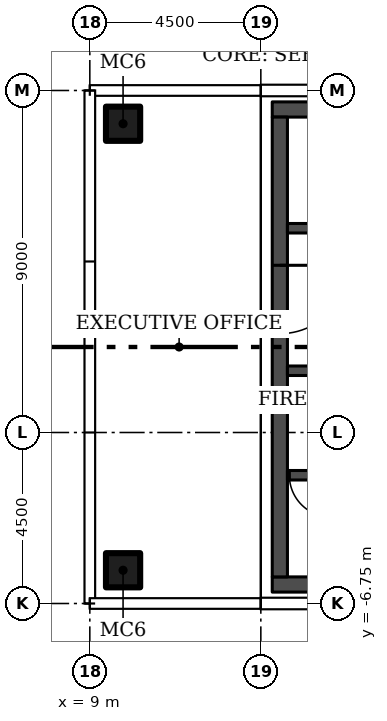
"""IFC4 building model, lengths in metres.
Left out: names, types, materials, properties, quantities, classifications, styles, units other than length and angle.
Written with IfcOpenShell. Run it as: python <this file> out.ifc"""

import sys

from ifc_helpers import new_model, si_unit, direction, frame, frame_2d, origin, origin_2d, place, context, subcontext, project, spatial, rectangle, hollow_rectangle, extrude, element, fill, save


model = new_model("IFC4")
c1 = context("Model", 3, precision=1e-05, world=origin(), true_north=direction((0.0, 1.0)))
c2 = subcontext(c1, "Body", "Model", "MODEL_VIEW")
j1 = project(units=[si_unit("LENGTHUNIT", "METRE"), si_unit("PLANEANGLEUNIT", "RADIAN")], contexts=[c1])
p1 = place(None, origin())
s1 = spatial("IfcSite", under=j1, at=p1, CompositionType="ELEMENT")
p2 = place(p1, origin())
s2 = spatial("IfcBuilding", under=s1, at=p2, CompositionType="ELEMENT")
p3 = place(p2, frame((0.0, 0.0, 230.4)))
s3 = spatial("IfcBuildingStorey", under=s2, at=p3, CompositionType="ELEMENT", Elevation=230.4)
for number, where in (
    (1, (9.875, -5.875, 0.0)),
    (2, (9.875, 5.875, 0.0)),
):
    element("IfcColumn", number, at=place(p3, frame(where)), inside=s3, PredefinedType="COLUMN", context=c2, shape_type="SweptSolid", body=[
        extrude(hollow_rectangle(XDim=0.9, YDim=0.9, WallThickness=0.036, at=origin_2d()), origin(), (0.0, 0.0, 1.0), 3.55),
    ])
for number, where in (
    (3, (13.8, -6.25, 0.0)),
    (4, (13.8, 6.25, 0.0)),
):
    element("IfcWall", number, at=place(p3, frame(where)), inside=s3, PredefinedType="SHEAR", context=c2, shape_type="SweptSolid", body=[
        extrude(rectangle(XDim=12.9, YDim=0.4, at=frame_2d((6.45, 0.0))), origin(), (0.0, 0.0, 1.0), 3.55),
    ])
p4 = place(p3, frame((14.0, 6.05, 0.0), z_axis=(0.0, 0.0, 1.0), x_axis=(0.0, -1.0, 0.0)))
e5 = element("IfcWall", 5, at=p4, inside=s3, PredefinedType="SHEAR", context=c2, shape_type="SweptSolid", body=[
    extrude(rectangle(XDim=12.1, YDim=0.4, at=frame_2d((6.05, 0.0))), origin(), (0.0, 0.0, 1.0), 3.55),
])
p5 = place(p4, frame((3.9, 0.0, 0.0)))
e6 = element("IfcOpeningElement", 6, at=p5, cuts=e5, PredefinedType="OPENING", context=c2, shape_type="SweptSolid", body=[
    extrude(rectangle(XDim=1.8, YDim=2.4, at=frame_2d((0.9, 1.2))), frame((0.0, 0.21, 0.0), z_axis=(0.0, -1.0, 0.0), x_axis=(1.0, 0.0, 0.0)), (0.0, 0.0, 1.0), 0.42),
])
p6 = place(p3, frame((26.3, -3.375, 0.0), z_axis=(0.0, 0.0, 1.0), x_axis=(-1.0, 0.0, 0.0)))
e7 = element("IfcWall", 7, at=p6, inside=s3, PredefinedType="SHEAR", context=c2, shape_type="SweptSolid", body=[
    extrude(rectangle(XDim=12.1, YDim=0.25, at=frame_2d((6.05, 0.0))), origin(), (0.0, 0.0, 1.0), 3.55),
])
p7 = place(p6, frame((10.95, 0.0, 0.0)))
e8 = element("IfcOpeningElement", 8, at=p7, cuts=e7, PredefinedType="OPENING", context=c2, shape_type="SweptSolid", body=[
    extrude(rectangle(XDim=1.1, YDim=2.1, at=frame_2d((0.55, 1.05))), frame((0.0, 0.135, 0.0), z_axis=(0.0, -1.0, 0.0), x_axis=(1.0, 0.0, 0.0)), (0.0, 0.0, 1.0), 0.27),
])
p8 = place(p3, frame((26.3, -0.625, 0.0), z_axis=(0.0, 0.0, 1.0), x_axis=(-1.0, 0.0, 0.0)))
e9 = element("IfcWall", 9, at=p8, inside=s3, PredefinedType="SHEAR", context=c2, shape_type="SweptSolid", body=[
    extrude(rectangle(XDim=12.1, YDim=0.25, at=frame_2d((6.05, 0.0))), origin(), (0.0, 0.0, 1.0), 3.55),
])
p9 = place(p8, frame((8.65, 0.0, 0.0)))
e10 = element("IfcOpeningElement", 10, at=p9, cuts=e9, PredefinedType="OPENING", context=c2, shape_type="SweptSolid", body=[
    extrude(rectangle(XDim=1.2, YDim=2.1, at=frame_2d((0.6, 1.05))), frame((0.0, 0.135, 0.0), z_axis=(0.0, -1.0, 0.0), x_axis=(1.0, 0.0, 0.0)), (0.0, 0.0, 1.0), 0.27),
])
p10 = place(p8, frame((1.7, 0.0, 0.0)))
e11 = element("IfcOpeningElement", 11, at=p10, cuts=e9, PredefinedType="OPENING", context=c2, shape_type="SweptSolid", body=[
    extrude(rectangle(XDim=0.9, YDim=2.1, at=frame_2d((0.45, 1.05))), frame((0.0, 0.135, 0.0), z_axis=(0.0, -1.0, 0.0), x_axis=(1.0, 0.0, 0.0)), (0.0, 0.0, 1.0), 0.27),
])
p11 = place(p8, frame((0.075, 0.0, 0.0)))
e12 = element("IfcOpeningElement", 12, at=p11, cuts=e9, PredefinedType="OPENING", context=c2, shape_type="SweptSolid", body=[
    extrude(rectangle(XDim=0.9, YDim=2.1, at=frame_2d((0.45, 1.05))), frame((0.0, 0.135, 0.0), z_axis=(0.0, -1.0, 0.0), x_axis=(1.0, 0.0, 0.0)), (0.0, 0.0, 1.0), 0.27),
])
p12 = place(p3, frame((14.2, 3.125, 0.0)))
e13 = element("IfcWall", 13, at=p12, inside=s3, PredefinedType="SHEAR", context=c2, shape_type="SweptSolid", body=[
    extrude(rectangle(XDim=12.1, YDim=0.25, at=frame_2d((6.05, 0.0))), origin(), (0.0, 0.0, 1.0), 3.55),
])
p13 = place(p12, frame((6.95, 0.0, 0.0)))
e14 = element("IfcOpeningElement", 14, at=p13, cuts=e13, PredefinedType="OPENING", context=c2, shape_type="SweptSolid", body=[
    extrude(rectangle(XDim=1.1, YDim=2.1, at=frame_2d((0.55, 1.05))), frame((0.0, 0.135, 0.0), z_axis=(0.0, -1.0, 0.0), x_axis=(1.0, 0.0, 0.0)), (0.0, 0.0, 1.0), 0.27),
])
p14 = place(p12, frame((10.075, 0.0, 0.0)))
e15 = element("IfcOpeningElement", 15, at=p14, cuts=e13, PredefinedType="OPENING", context=c2, shape_type="SweptSolid", body=[
    extrude(rectangle(XDim=1.1, YDim=2.1, at=frame_2d((0.55, 1.05))), frame((0.0, 0.135, 0.0), z_axis=(0.0, -1.0, 0.0), x_axis=(1.0, 0.0, 0.0)), (0.0, 0.0, 1.0), 0.27),
])
p15 = place(p12, frame((2.475, 0.0, 0.0)))
e16 = element("IfcOpeningElement", 16, at=p15, cuts=e13, PredefinedType="OPENING", context=c2, shape_type="SweptSolid", body=[
    extrude(rectangle(XDim=0.9, YDim=2.1, at=frame_2d((0.45, 1.05))), frame((0.0, 0.135, 0.0), z_axis=(0.0, -1.0, 0.0), x_axis=(1.0, 0.0, 0.0)), (0.0, 0.0, 1.0), 0.27),
])
p16 = place(p5, origin())
e17 = element("IfcDoor", 17, at=p16, inside=s3, OperationType="DOUBLE_DOOR_SINGLE_SWING", PredefinedType="DOOR", context=c2, shape_type="SweptSolid", body=[
    extrude(rectangle(XDim=1.8, YDim=2.4, at=frame_2d((0.9, 1.2))), frame((0.0, 0.025, 0.0), z_axis=(0.0, -1.0, 0.0), x_axis=(1.0, 0.0, 0.0)), (0.0, 0.0, 1.0), 0.05),
])
fill(e6, e17)
p17 = place(p7, origin())
e18 = element("IfcDoor", 18, at=p17, inside=s3, OperationType="SINGLE_SWING_RIGHT", PredefinedType="DOOR", context=c2, shape_type="SweptSolid", body=[
    extrude(rectangle(XDim=1.1, YDim=2.1, at=frame_2d((0.55, 1.05))), frame((0.0, 0.025, 0.0), z_axis=(0.0, -1.0, 0.0), x_axis=(1.0, 0.0, 0.0)), (0.0, 0.0, 1.0), 0.05),
])
fill(e8, e18)
save(model, sys.argv[1])
